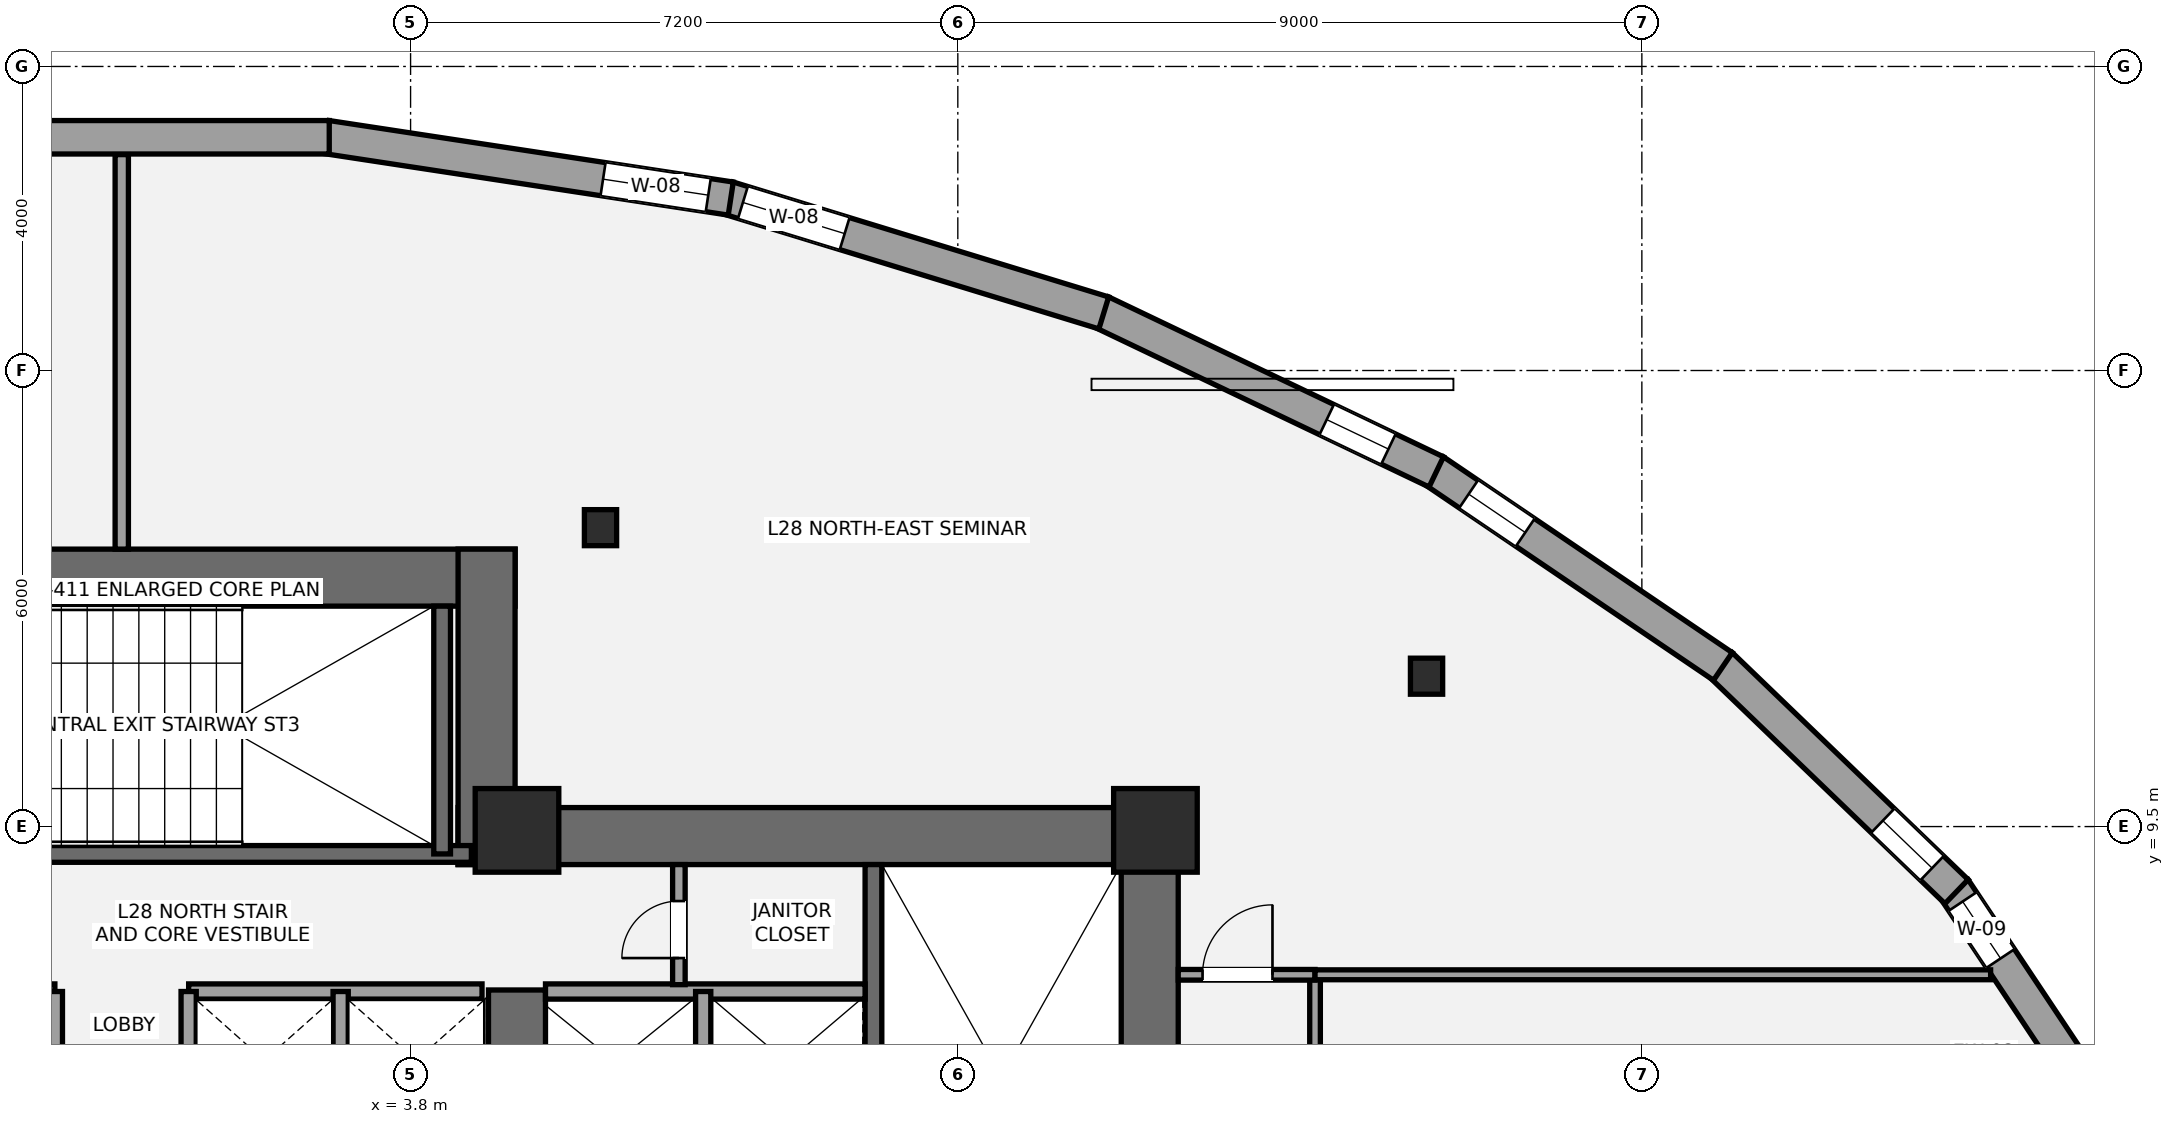
"""IFC4 building model, lengths in metres.
Left out: names, types, materials, properties, quantities, classifications, styles, units other than length and angle.
Written with IfcOpenShell. Run it as: python <this file> out.ifc"""

import sys

from ifc_helpers import new_model, si_unit, direction, frame, frame_2d, origin, origin_2d, place, context, subcontext, project, spatial, rectangle, i_section, extrude, element, fill, save


model = new_model("IFC4")
c1 = context("Model", 3, precision=1e-05, world=origin(), true_north=direction((0.0, 1.0)))
c2 = subcontext(c1, "Body", "Model", "MODEL_VIEW")
j1 = project(units=[si_unit("LENGTHUNIT", "METRE"), si_unit("PLANEANGLEUNIT", "RADIAN")], contexts=[c1])
p1 = place(None, origin())
s1 = spatial("IfcSite", under=j1, at=p1, CompositionType="ELEMENT")
p2 = place(p1, origin())
s2 = spatial("IfcBuilding", under=s1, at=p2, CompositionType="ELEMENT")
p3 = place(p2, frame((0.0, 0.0, 107.1)))
s3 = spatial("IfcBuildingStorey", under=s2, at=p3, CompositionType="ELEMENT", Elevation=107.1)
p4 = place(p3, frame((13.525, 1.1, 0.0), z_axis=(0.0, 0.0, 1.0), x_axis=(0.0, 1.0, 0.0)))
e1 = element("IfcWall", 1, at=p4, inside=s3, PredefinedType="SHEAR", context=c2, shape_type="SweptSolid", body=[
    extrude(rectangle(XDim=8.65, YDim=0.75, at=frame_2d((4.325, 0.0))), origin(), (0.0, 0.0, 1.0), 3.5),
])
p5 = place(p3, frame((4.425, 9.375, 0.0), z_axis=(0.0, 0.0, 1.0), x_axis=(1.0, 0.0, 0.0)))
e2 = element("IfcWall", 2, at=p5, inside=s3, PredefinedType="SHEAR", context=c2, shape_type="SweptSolid", body=[
    extrude(rectangle(XDim=9.475, YDim=0.75, at=frame_2d((4.737, 0.0))), origin(), (0.0, 0.0, 1.0), 3.5),
])
p6 = place(p3, frame((5.2, 5.35, 0.0), z_axis=(0.0, 0.0, 1.0), x_axis=(0.0, 1.0, 0.0)))
e3 = element("IfcWall", 3, at=p6, inside=s3, PredefinedType="SHEAR", context=c2, shape_type="SweptSolid", body=[
    extrude(rectangle(XDim=2.0, YDim=0.75, at=frame_2d((1.0, 0.0))), origin(), (0.0, 0.0, 1.0), 3.5),
])
p7 = place(p3, frame((9.89, 1.85, 0.0), z_axis=(0.0, 0.0, 1.0), x_axis=(0.0, 1.0, 0.0)))
e4 = element("IfcWall", 4, at=p7, inside=s3, PredefinedType="SHEAR", context=c2, shape_type="SweptSolid", body=[
    extrude(rectangle(XDim=7.15, YDim=0.22, at=frame_2d((3.575, 0.0))), origin(), (0.0, 0.0, 1.0), 3.5),
])
p8 = place(p3, frame((-5.175, 12.775, 0.0), z_axis=(0.0, 0.0, 1.0), x_axis=(1.0, 0.0, 0.0)))
e5 = element("IfcWall", 5, at=p8, inside=s3, PredefinedType="SHEAR", context=c2, shape_type="SweptSolid", body=[
    extrude(rectangle(XDim=10.35, YDim=0.75, at=frame_2d((5.175, 0.0))), origin(), (0.0, 0.0, 1.0), 3.5),
])
p9 = place(p3, frame((4.8, 9.0, 0.0), z_axis=(0.0, 0.0, 1.0), x_axis=(0.0, 1.0, 0.0)))
e6 = element("IfcWall", 6, at=p9, inside=s3, PredefinedType="SHEAR", context=c2, shape_type="SweptSolid", body=[
    extrude(rectangle(XDim=4.15, YDim=0.75, at=frame_2d((2.075, 0.0))), origin(), (0.0, 0.0, 1.0), 3.5),
])
p10 = place(p3, frame((-4.7, 9.14, 0.0), z_axis=(0.0, 0.0, 1.0), x_axis=(1.0, 0.0, 0.0)))
e7 = element("IfcWall", 7, at=p10, inside=s3, PredefinedType="SHEAR", context=c2, shape_type="SweptSolid", body=[
    extrude(rectangle(XDim=9.3, YDim=0.22, at=frame_2d((4.65, 0.0))), origin(), (0.0, 0.0, 1.0), 3.5),
])
p11 = place(p10, frame((1.15, 0.0, 0.0)))
e8 = element("IfcOpeningElement", 8, at=p11, cuts=e7, PredefinedType="OPENING", context=c2, shape_type="SweptSolid", body=[
    extrude(rectangle(XDim=1.05, YDim=2.15, at=frame_2d((0.525, 1.075))), frame((0.0, 0.12, 0.0), z_axis=(0.0, -1.0, 0.0), x_axis=(1.0, 0.0, 0.0)), (0.0, 0.0, 1.0), 0.24),
])
p12 = place(p3, frame((4.215, 9.14, 0.0), z_axis=(0.0, 0.0, 1.0), x_axis=(0.0, 1.0, 0.0)))
e9 = element("IfcWall", 9, at=p12, inside=s3, PredefinedType="SHEAR", context=c2, shape_type="SweptSolid", body=[
    extrude(rectangle(XDim=3.26, YDim=0.22, at=frame_2d((1.63, 0.0))), origin(), (0.0, 0.0, 1.0), 3.5),
])
for number, where, z_axis, x_axis in (
    (10, (5.2, 9.45, 0.0), (0.0, 0.0, 1.0), (1.0, 0.0, 0.0)),
    (11, (13.6, 9.45, 0.0), (0.0, 0.0, 1.0), (1.0, 0.0, 0.0)),
):
    element("IfcColumn", number, at=place(p3, frame(where, z_axis=z_axis, x_axis=x_axis)), inside=s3, PredefinedType="COLUMN", context=c2, shape_type="SweptSolid", body=[
        extrude(rectangle(XDim=1.1, YDim=1.1, at=origin_2d()), origin(), (0.0, 0.0, 1.0), 3.5),
    ])
for number, where, z_axis, x_axis in (
    (12, (17.167, 11.478, 0.0), (0.0, 0.0, 1.0), (1.0, 0.0, 0.0)),
    (13, (6.299, 13.433, 0.0), (0.0, 0.0, 1.0), (1.0, 0.0, 0.0)),
):
    element("IfcColumn", number, at=place(p3, frame(where, z_axis=z_axis, x_axis=x_axis)), inside=s3, PredefinedType="COLUMN", context=c2, shape_type="SweptSolid", body=[
        extrude(i_section(OverallWidth=0.424, OverallDepth=0.474, WebThickness=0.048, FlangeThickness=0.077, at=origin_2d()), origin(), (0.0, 0.0, 1.0), 3.5),
    ])
p13 = place(p3, frame((24.11, 8.68, 0.0), z_axis=(0.0, 0.0, 1.0), x_axis=(0.554293965046, -0.83232097193, 0.0)))
e14 = element("IfcWall", 14, at=p13, inside=s3, PredefinedType="STANDARD", context=c2, shape_type="SweptSolid", body=[
    extrude(rectangle(XDim=4.023, YDim=0.44, at=frame_2d((2.011, 0.0))), origin(), (0.0, 0.0, 1.0), 2.528),
])
p14 = place(p13, frame((0.2, 0.0, 0.58)))
e15 = element("IfcOpeningElement", 15, at=p14, cuts=e14, PredefinedType="OPENING", context=c2, shape_type="SweptSolid", body=[
    extrude(rectangle(XDim=0.9, YDim=1.35, at=frame_2d((0.45, 0.675))), frame((0.0, 0.23, 0.0), z_axis=(0.0, -1.0, 0.0), x_axis=(1.0, 0.0, 0.0)), (0.0, 0.0, 1.0), 0.46),
])
p15 = place(p3, frame((21.037, 11.63, 0.0), z_axis=(0.0, 0.0, 1.0), x_axis=(0.720581378362, -0.693370375166, 0.0)))
e16 = element("IfcWall", 16, at=p15, inside=s3, PredefinedType="STANDARD", context=c2, shape_type="SweptSolid", body=[
    extrude(rectangle(XDim=4.307, YDim=0.44, at=frame_2d((2.153, 0.0))), origin(), (0.0, 0.0, 1.0), 2.528),
])
p16 = place(p15, frame((2.96, 0.0, 0.58)))
e17 = element("IfcOpeningElement", 17, at=p16, cuts=e16, PredefinedType="OPENING", context=c2, shape_type="SweptSolid", body=[
    extrude(rectangle(XDim=0.9, YDim=1.35, at=frame_2d((0.45, 0.675))), frame((0.0, 0.23, 0.0), z_axis=(0.0, -1.0, 0.0), x_axis=(1.0, 0.0, 0.0)), (0.0, 0.0, 1.0), 0.46),
])
p17 = place(p3, frame((17.266, 14.182, 0.0), z_axis=(0.0, 0.0, 1.0), x_axis=(0.827754551165, -0.56109036975, 0.0)))
e18 = element("IfcWall", 18, at=p17, inside=s3, PredefinedType="STANDARD", context=c2, shape_type="SweptSolid", body=[
    extrude(rectangle(XDim=4.591, YDim=0.44, at=frame_2d((2.295, 0.0))), origin(), (0.0, 0.0, 1.0), 2.528),
])
p18 = place(p17, frame((0.549, 0.0, 0.58)))
e19 = element("IfcOpeningElement", 19, at=p18, cuts=e18, PredefinedType="OPENING", context=c2, shape_type="SweptSolid", body=[
    extrude(rectangle(XDim=0.9, YDim=1.35, at=frame_2d((0.45, 0.675))), frame((0.0, 0.23, 0.0), z_axis=(0.0, -1.0, 0.0), x_axis=(1.0, 0.0, 0.0)), (0.0, 0.0, 1.0), 0.46),
])
p19 = place(p3, frame((12.89, 16.27, 0.0), z_axis=(0.0, 0.0, 1.0), x_axis=(0.902372757907, -0.430956385018, 0.0)))
e20 = element("IfcWall", 20, at=p19, inside=s3, PredefinedType="STANDARD", context=c2, shape_type="SweptSolid", body=[
    extrude(rectangle(XDim=4.882, YDim=0.44, at=frame_2d((2.441, 0.0))), origin(), (0.0, 0.0, 1.0), 2.528),
])
p20 = place(p19, frame((3.284, 0.0, 0.58)))
e21 = element("IfcOpeningElement", 21, at=p20, cuts=e20, PredefinedType="OPENING", context=c2, shape_type="SweptSolid", body=[
    extrude(rectangle(XDim=0.9, YDim=1.35, at=frame_2d((0.45, 0.675))), frame((0.0, 0.23, 0.0), z_axis=(0.0, -1.0, 0.0), x_axis=(1.0, 0.0, 0.0)), (0.0, 0.0, 1.0), 0.46),
])
p21 = place(p3, frame((7.981, 17.769, 0.0), z_axis=(0.0, 0.0, 1.0), x_axis=(0.956228569431, -0.292620783617, 0.0)))
e22 = element("IfcWall", 22, at=p21, inside=s3, PredefinedType="STANDARD", context=c2, shape_type="SweptSolid", body=[
    extrude(rectangle(XDim=5.165, YDim=0.44, at=frame_2d((2.583, 0.0))), origin(), (0.0, 0.0, 1.0), 2.528),
])
p22 = place(p21, frame((0.2, 0.0, 0.58)))
e23 = element("IfcOpeningElement", 23, at=p22, cuts=e22, PredefinedType="OPENING", context=c2, shape_type="SweptSolid", body=[
    extrude(rectangle(XDim=1.4, YDim=1.55, at=frame_2d((0.7, 0.775))), frame((0.0, 0.23, 0.0), z_axis=(0.0, -1.0, 0.0), x_axis=(1.0, 0.0, 0.0)), (0.0, 0.0, 1.0), 0.46),
])
p23 = place(p3, frame((2.697, 18.571, 0.0), z_axis=(0.0, 0.0, 1.0), x_axis=(0.988627497469, -0.150385076545, 0.0)))
e24 = element("IfcWall", 24, at=p23, inside=s3, PredefinedType="STANDARD", context=c2, shape_type="SweptSolid", body=[
    extrude(rectangle(XDim=5.377, YDim=0.44, at=frame_2d((2.688, 0.0))), origin(), (0.0, 0.0, 1.0), 2.528),
])
p24 = place(p23, frame((3.677, 0.0, 0.58)))
e25 = element("IfcOpeningElement", 25, at=p24, cuts=e24, PredefinedType="OPENING", context=c2, shape_type="SweptSolid", body=[
    extrude(rectangle(XDim=1.4, YDim=1.55, at=frame_2d((0.7, 0.775))), frame((0.0, 0.23, 0.0), z_axis=(0.0, -1.0, 0.0), x_axis=(1.0, 0.0, 0.0)), (0.0, 0.0, 1.0), 0.46),
])
p25 = place(p3, frame((-2.73, 18.568, 0.0), z_axis=(0.0, 0.0, 1.0), x_axis=(1.0, 0.0, 0.0)))
e26 = element("IfcWall", 26, at=p25, inside=s3, PredefinedType="STANDARD", context=c2, shape_type="SweptSolid", body=[
    extrude(rectangle(XDim=5.459, YDim=0.44, at=frame_2d((2.73, 0.0))), origin(), (0.0, 0.0, 1.0), 2.528),
])
p26 = place(p25, frame((0.2, 0.0, 0.48)))
e27 = element("IfcOpeningElement", 27, at=p26, cuts=e26, PredefinedType="OPENING", context=c2, shape_type="SweptSolid", body=[
    extrude(rectangle(XDim=1.5, YDim=1.7, at=frame_2d((0.75, 0.85))), frame((0.0, 0.23, 0.0), z_axis=(0.0, -1.0, 0.0), x_axis=(1.0, 0.0, 0.0)), (0.0, 0.0, 1.0), 0.46),
])
p27 = place(p3, frame((5.575, 7.33, 0.0), z_axis=(0.0, 0.0, 1.0), x_axis=(1.0, 0.0, 0.0)))
e28 = element("IfcWall", 28, at=p27, inside=s3, PredefinedType="SOLIDWALL", context=c2, shape_type="SweptSolid", body=[
    extrude(rectangle(XDim=4.205, YDim=0.2, at=frame_2d((2.103, 0.0))), origin(), (0.0, 0.0, 1.0), 3.31),
])
p28 = place(p3, frame((7.65, 5.47, 0.0), z_axis=(0.0, 0.0, 1.0), x_axis=(0.0, 1.0, 0.0)))
e29 = element("IfcWall", 29, at=p28, inside=s3, PredefinedType="SOLIDWALL", context=c2, shape_type="SweptSolid", body=[
    extrude(rectangle(XDim=1.86, YDim=0.2, at=frame_2d((0.93, 0.0))), origin(), (0.0, 0.0, 1.0), 3.31),
])
for number, where, z_axis, x_axis in (
    (30, (-4.74, 7.33, 0.0), (0.0, 0.0, 1.0), (1.0, 0.0, 0.0)),
    (31, (0.88, 7.33, 0.0), (0.0, 0.0, 1.0), (1.0, 0.0, 0.0)),
):
    element("IfcWall", number, at=place(p3, frame(where, z_axis=z_axis, x_axis=x_axis)), inside=s3, PredefinedType="SOLIDWALL", context=c2, shape_type="SweptSolid", body=[
        extrude(rectangle(XDim=3.86, YDim=0.2, at=frame_2d((1.93, 0.0))), origin(), (0.0, 0.0, 1.0), 3.31),
    ])
for number, where, z_axis, x_axis in (
    (32, (2.88, 5.52, 0.0), (0.0, 0.0, 1.0), (0.0, 1.0, 0.0)),
    (33, (-0.88, 5.52, 0.0), (0.0, 0.0, 1.0), (0.0, 1.0, 0.0)),
    (34, (0.88, 5.52, 0.0), (0.0, 0.0, 1.0), (0.0, 1.0, 0.0)),
):
    element("IfcWall", number, at=place(p3, frame(where, z_axis=z_axis, x_axis=x_axis)), inside=s3, PredefinedType="SOLIDWALL", context=c2, shape_type="SweptSolid", body=[
        extrude(rectangle(XDim=1.81, YDim=0.2, at=frame_2d((0.905, 0.0))), origin(), (0.0, 0.0, 1.0), 3.31),
    ])
p29 = place(p3, frame((7.33, 7.42, 0.0), z_axis=(0.0, 0.0, 1.0), x_axis=(0.0, 1.0, 0.0)))
e35 = element("IfcWall", 35, at=p29, inside=s3, PredefinedType="PARTITIONING", context=c2, shape_type="SweptSolid", body=[
    extrude(rectangle(XDim=1.58, YDim=0.165, at=frame_2d((0.79, 0.0))), origin(), (0.0, 0.0, 1.0), 3.31),
])
p30 = place(p29, frame((0.35, 0.0, 0.0)))
e36 = element("IfcOpeningElement", 36, at=p30, cuts=e35, PredefinedType="OPENING", context=c2, shape_type="SweptSolid", body=[
    extrude(rectangle(XDim=0.75, YDim=2.1, at=frame_2d((0.375, 1.05))), frame((0.0, 0.093, 0.0), z_axis=(0.0, -1.0, 0.0), x_axis=(1.0, 0.0, 0.0)), (0.0, 0.0, 1.0), 0.185),
])
p31 = place(p3, frame((15.7, -14.675, 0.0), z_axis=(0.0, 0.0, 1.0), x_axis=(0.0, 1.0, 0.0)))
e37 = element("IfcWall", 37, at=p31, inside=s3, PredefinedType="PARTITIONING", context=c2, shape_type="SweptSolid", body=[
    extrude(rectangle(XDim=22.225, YDim=0.14, at=frame_2d((11.112, 0.0))), origin(), (0.0, 0.0, 1.0), 2.763),
])
p32 = place(p31, frame((9.325, 0.0, 0.0)))
e38 = element("IfcOpeningElement", 38, at=p32, cuts=e37, PredefinedType="OPENING", context=c2, shape_type="SweptSolid", body=[
    extrude(rectangle(XDim=0.9, YDim=2.1, at=frame_2d((0.45, 1.05))), frame((0.0, 0.08, 0.0), z_axis=(0.0, -1.0, 0.0), x_axis=(1.0, 0.0, 0.0)), (0.0, 0.0, 1.0), 0.16),
])
p33 = place(p31, frame((13.525, 0.0, 0.0)))
e39 = element("IfcOpeningElement", 39, at=p33, cuts=e37, PredefinedType="OPENING", context=c2, shape_type="SweptSolid", body=[
    extrude(rectangle(XDim=0.9, YDim=2.1, at=frame_2d((0.45, 1.05))), frame((0.0, 0.08, 0.0), z_axis=(0.0, -1.0, 0.0), x_axis=(1.0, 0.0, 0.0)), (0.0, 0.0, 1.0), 0.16),
])
p34 = place(p31, frame((16.925, 0.0, 0.0)))
e40 = element("IfcOpeningElement", 40, at=p34, cuts=e37, PredefinedType="OPENING", context=c2, shape_type="SweptSolid", body=[
    extrude(rectangle(XDim=0.9, YDim=2.1, at=frame_2d((0.45, 1.05))), frame((0.0, 0.08, 0.0), z_axis=(0.0, -1.0, 0.0), x_axis=(1.0, 0.0, 0.0)), (0.0, 0.0, 1.0), 0.16),
])
p35 = place(p31, frame((20.2, 0.0, 0.0)))
e41 = element("IfcOpeningElement", 41, at=p35, cuts=e37, PredefinedType="OPENING", context=c2, shape_type="SweptSolid", body=[
    extrude(rectangle(XDim=0.9, YDim=2.1, at=frame_2d((0.45, 1.05))), frame((0.0, 0.08, 0.0), z_axis=(0.0, -1.0, 0.0), x_axis=(1.0, 0.0, 0.0)), (0.0, 0.0, 1.0), 0.16),
])
p36 = place(p3, frame((13.9, 7.55, 0.0), z_axis=(0.0, 0.0, 1.0), x_axis=(1.0, 0.0, 0.0)))
e42 = element("IfcWall", 42, at=p36, inside=s3, PredefinedType="PARTITIONING", context=c2, shape_type="SweptSolid", body=[
    extrude(rectangle(XDim=1.8, YDim=0.14, at=frame_2d((0.9, 0.0))), origin(), (0.0, 0.0, 1.0), 2.763),
])
p37 = place(p36, frame((0.32, 0.0, 0.0)))
e43 = element("IfcOpeningElement", 43, at=p37, cuts=e42, PredefinedType="OPENING", context=c2, shape_type="SweptSolid", body=[
    extrude(rectangle(XDim=0.92, YDim=2.15, at=frame_2d((0.46, 1.075))), frame((0.0, 0.08, 0.0), z_axis=(0.0, -1.0, 0.0), x_axis=(1.0, 0.0, 0.0)), (0.0, 0.0, 1.0), 0.16),
])
p38 = place(p3, frame((0.0, 13.15, 0.0), z_axis=(0.0, 0.0, 1.0), x_axis=(0.0, 1.0, 0.0)))
e44 = element("IfcWall", 44, at=p38, inside=s3, PredefinedType="PARTITIONING", context=c2, shape_type="SweptSolid", body=[
    extrude(rectangle(XDim=5.19, YDim=0.175, at=frame_2d((2.595, 0.0))), origin(), (0.0, 0.0, 1.0), 3.31),
])
p39 = place(p3, frame((15.7, 7.55, 0.0), z_axis=(0.0, 0.0, 1.0), x_axis=(1.0, 0.0, 0.0)))
e45 = element("IfcWall", 45, at=p39, inside=s3, PredefinedType="PARTITIONING", context=c2, shape_type="SweptSolid", body=[
    extrude(rectangle(XDim=8.889, YDim=0.13, at=frame_2d((4.444, 0.0))), origin(), (0.0, 0.0, 1.0), 2.763),
])
p40 = place(p14, origin())
e46 = element("IfcWindow", 46, at=p40, inside=s3, PartitioningType="SINGLE_PANEL", PredefinedType="WINDOW", context=c2, shape_type="SweptSolid", body=[
    extrude(rectangle(XDim=0.9, YDim=1.35, at=frame_2d((0.45, 0.675))), frame((0.0, -0.01, 0.0), z_axis=(0.0, -1.0, 0.0), x_axis=(1.0, 0.0, 0.0)), (0.0, 0.0, 1.0), 0.06),
])
fill(e15, e46)
p41 = place(p16, origin())
e47 = element("IfcWindow", 47, at=p41, inside=s3, PartitioningType="SINGLE_PANEL", PredefinedType="WINDOW", context=c2, shape_type="SweptSolid", body=[
    extrude(rectangle(XDim=0.9, YDim=1.35, at=frame_2d((0.45, 0.675))), frame((0.0, -0.01, 0.0), z_axis=(0.0, -1.0, 0.0), x_axis=(1.0, 0.0, 0.0)), (0.0, 0.0, 1.0), 0.06),
])
fill(e17, e47)
p42 = place(p18, origin())
e48 = element("IfcWindow", 48, at=p42, inside=s3, PartitioningType="SINGLE_PANEL", PredefinedType="WINDOW", context=c2, shape_type="SweptSolid", body=[
    extrude(rectangle(XDim=0.9, YDim=1.35, at=frame_2d((0.45, 0.675))), frame((0.0, -0.01, 0.0), z_axis=(0.0, -1.0, 0.0), x_axis=(1.0, 0.0, 0.0)), (0.0, 0.0, 1.0), 0.06),
])
fill(e19, e48)
p43 = place(p20, origin())
e49 = element("IfcWindow", 49, at=p43, inside=s3, PartitioningType="SINGLE_PANEL", PredefinedType="WINDOW", context=c2, shape_type="SweptSolid", body=[
    extrude(rectangle(XDim=0.9, YDim=1.35, at=frame_2d((0.45, 0.675))), frame((0.0, -0.01, 0.0), z_axis=(0.0, -1.0, 0.0), x_axis=(1.0, 0.0, 0.0)), (0.0, 0.0, 1.0), 0.06),
])
fill(e21, e49)
p44 = place(p22, origin())
e50 = element("IfcWindow", 50, at=p44, inside=s3, PartitioningType="SINGLE_PANEL", PredefinedType="WINDOW", context=c2, shape_type="SweptSolid", body=[
    extrude(rectangle(XDim=1.4, YDim=1.55, at=frame_2d((0.7, 0.775))), frame((0.0, -0.01, 0.0), z_axis=(0.0, -1.0, 0.0), x_axis=(1.0, 0.0, 0.0)), (0.0, 0.0, 1.0), 0.06),
])
fill(e23, e50)
p45 = place(p24, origin())
e51 = element("IfcWindow", 51, at=p45, inside=s3, PartitioningType="SINGLE_PANEL", PredefinedType="WINDOW", context=c2, shape_type="SweptSolid", body=[
    extrude(rectangle(XDim=1.4, YDim=1.55, at=frame_2d((0.7, 0.775))), frame((0.0, -0.01, 0.0), z_axis=(0.0, -1.0, 0.0), x_axis=(1.0, 0.0, 0.0)), (0.0, 0.0, 1.0), 0.06),
])
fill(e25, e51)
p46 = place(p30, origin())
e52 = element("IfcDoor", 52, at=p46, inside=s3, OperationType="SINGLE_SWING_LEFT", PredefinedType="DOOR", context=c2, shape_type="SweptSolid", body=[
    extrude(rectangle(XDim=0.75, YDim=2.1, at=frame_2d((0.375, 1.05))), frame((0.0, 0.025, 0.0), z_axis=(0.0, -1.0, 0.0), x_axis=(1.0, 0.0, 0.0)), (0.0, 0.0, 1.0), 0.05),
])
fill(e36, e52)
p47 = place(p37, origin())
e53 = element("IfcDoor", 53, at=p47, inside=s3, OperationType="SINGLE_SWING_RIGHT", PredefinedType="DOOR", context=c2, shape_type="SweptSolid", body=[
    extrude(rectangle(XDim=0.92, YDim=2.15, at=frame_2d((0.46, 1.075))), frame((0.0, 0.025, 0.0), z_axis=(0.0, -1.0, 0.0), x_axis=(1.0, 0.0, 0.0)), (0.0, 0.0, 1.0), 0.05),
])
fill(e43, e53)
save(model, sys.argv[1])
